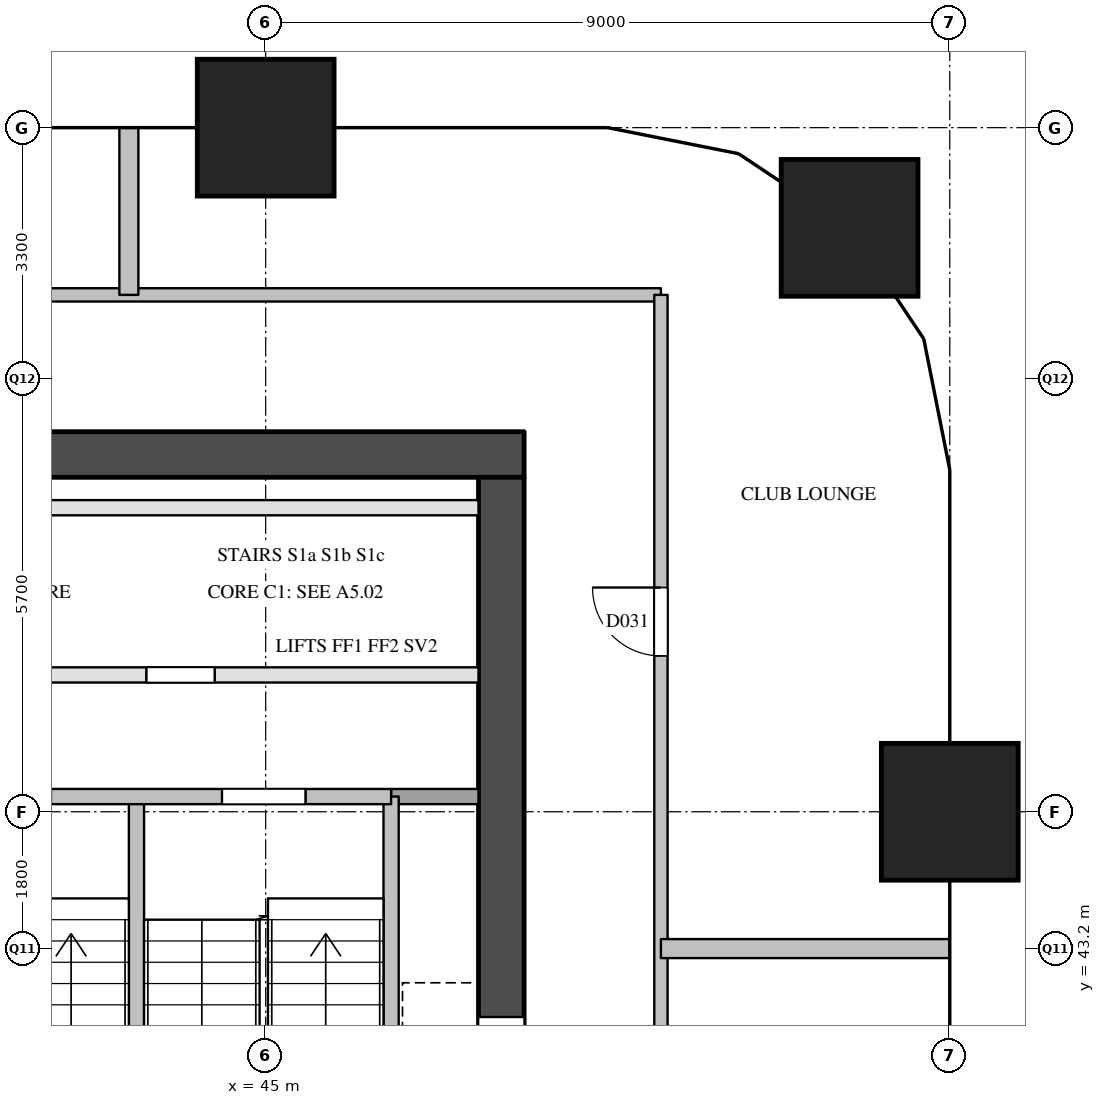
"""IFC4 building model, lengths in metres.
Left out: names, types, materials, properties, quantities, classifications, styles, units other than length and angle.
Written with IfcOpenShell. Run it as: python <this file> out.ifc"""

import sys

from ifc_helpers import new_model, si_unit, direction, frame, frame_2d, origin, origin_2d, place, context, subcontext, project, spatial, rectangle, extrude, element, fill, save


model = new_model("IFC4")
c1 = context("Model", 3, precision=1e-05, world=origin(), true_north=direction((0.0, 1.0)))
c2 = subcontext(c1, "Body", "Model", "MODEL_VIEW")
j1 = project(units=[si_unit("LENGTHUNIT", "METRE"), si_unit("PLANEANGLEUNIT", "RADIAN")], contexts=[c1])
p1 = place(None, origin())
s1 = spatial("IfcSite", under=j1, at=p1, CompositionType="ELEMENT")
p2 = place(p1, origin())
s2 = spatial("IfcBuilding", under=s1, at=p2, CompositionType="ELEMENT")
p3 = place(p2, frame((0.0, 0.0, 31.0)))
s3 = spatial("IfcBuildingStorey", under=s2, at=p3, CompositionType="ELEMENT", Elevation=31.0)
for number, where, z_axis, x_axis in (
    (1, (45.0, 54.0, 0.0), (0.0, 0.0, 1.0), (1.0, 0.0, 0.0)),
    (2, (54.0, 45.0, 0.0), (0.0, 0.0, 1.0), (1.0, 0.0, 0.0)),
    (3, (52.682, 52.682, 0.0), (0.0, 0.0, 1.0), (1.0, 0.0, 0.0)),
):
    element("IfcColumn", number, at=place(p3, frame(where, z_axis=z_axis, x_axis=x_axis)), inside=s3, PredefinedType="COLUMN", context=c2, shape_type="SweptSolid", body=[
        extrude(rectangle(XDim=1.8, YDim=1.8, at=origin_2d()), origin(), (0.0, 0.0, 1.0), 3.8),
    ])
p4 = place(p3, frame((36.0, 49.7, 0.0), z_axis=(0.0, 0.0, 1.0), x_axis=(1.0, 0.0, 0.0)))
e4 = element("IfcWall", 4, at=p4, inside=s3, PredefinedType="SHEAR", context=c2, shape_type="SweptSolid", body=[
    extrude(rectangle(XDim=12.4, YDim=0.6, at=frame_2d((6.2, 0.0))), origin(), (0.0, 0.0, 1.0), 3.5),
])
p5 = place(p3, frame((48.1, 29.1, 0.0), z_axis=(0.0, 0.0, 1.0), x_axis=(0.0, 1.0, 0.0)))
e5 = element("IfcWall", 5, at=p5, inside=s3, PredefinedType="SHEAR", context=c2, shape_type="SweptSolid", body=[
    extrude(rectangle(XDim=20.3, YDim=0.6, at=frame_2d((10.15, 0.0))), origin(), (0.0, 0.0, 1.0), 3.5),
])
p6 = place(p5, frame((12.5, 0.0, 0.0)))
e6 = element("IfcOpeningElement", 6, at=p6, cuts=e5, PredefinedType="OPENING", context=c2, shape_type="SweptSolid", body=[
    extrude(rectangle(XDim=0.7, YDim=2.1, at=frame_2d((0.35, 1.05))), frame((0.0, 0.31, 0.0), z_axis=(0.0, -1.0, 0.0), x_axis=(1.0, 0.0, 0.0)), (0.0, 0.0, 1.0), 0.62),
])
p7 = place(p5, frame((3.9, 0.0, 0.0)))
e7 = element("IfcOpeningElement", 7, at=p7, cuts=e5, PredefinedType="OPENING", context=c2, shape_type="SweptSolid", body=[
    extrude(rectangle(XDim=1.8, YDim=2.1, at=frame_2d((0.9, 1.05))), frame((0.0, 0.31, 0.0), z_axis=(0.0, -1.0, 0.0), x_axis=(1.0, 0.0, 0.0)), (0.0, 0.0, 1.0), 0.62),
])
for number, where, z_axis, x_axis in (
    (8, (43.3, 40.78, 0.0), (0.0, 0.0, 1.0), (0.0, 1.0, 0.0)),
    (9, (46.65, 40.78, 0.0), (0.0, 0.0, 1.0), (0.0, 1.0, 0.0)),
):
    element("IfcWall", number, at=place(p3, frame(where, z_axis=z_axis, x_axis=x_axis)), inside=s3, PredefinedType="SOLIDWALL", context=c2, shape_type="SweptSolid", body=[
        extrude(rectangle(XDim=4.42, YDim=0.2, at=frame_2d((2.21, 0.0))), origin(), (0.0, 0.0, 1.0), 3.5),
    ])
p8 = place(p3, frame((46.65, 45.2, 0.0), z_axis=(0.0, 0.0, 1.0), x_axis=(1.0, 0.0, 0.0)))
e10 = element("IfcWall", 10, at=p8, inside=s3, PredefinedType="SOLIDWALL", context=c2, shape_type="SweptSolid", body=[
    extrude(rectangle(XDim=1.15, YDim=0.2, at=frame_2d((0.575, 0.0))), origin(), (0.0, 0.0, 1.0), 3.5),
])
p9 = place(p3, frame((36.6, 45.2, 0.0), z_axis=(0.0, 0.0, 1.0), x_axis=(1.0, 0.0, 0.0)))
e11 = element("IfcWall", 11, at=p9, inside=s3, PredefinedType="SOLIDWALL", context=c2, shape_type="SweptSolid", body=[
    extrude(rectangle(XDim=10.05, YDim=0.2, at=frame_2d((5.025, 0.0))), origin(), (0.0, 0.0, 1.0), 3.5),
])
p10 = place(p9, frame((1.125, 0.0, 0.0)))
e12 = element("IfcOpeningElement", 12, at=p10, cuts=e11, PredefinedType="OPENING", context=c2, shape_type="SweptSolid", body=[
    extrude(rectangle(XDim=1.1, YDim=2.1, at=frame_2d((0.55, 1.05))), frame((0.0, 0.11, 0.0), z_axis=(0.0, -1.0, 0.0), x_axis=(1.0, 0.0, 0.0)), (0.0, 0.0, 1.0), 0.22),
])
p11 = place(p9, frame((4.475, 0.0, 0.0)))
e13 = element("IfcOpeningElement", 13, at=p11, cuts=e11, PredefinedType="OPENING", context=c2, shape_type="SweptSolid", body=[
    extrude(rectangle(XDim=1.1, YDim=2.1, at=frame_2d((0.55, 1.05))), frame((0.0, 0.11, 0.0), z_axis=(0.0, -1.0, 0.0), x_axis=(1.0, 0.0, 0.0)), (0.0, 0.0, 1.0), 0.22),
])
p12 = place(p9, frame((7.825, 0.0, 0.0)))
e14 = element("IfcOpeningElement", 14, at=p12, cuts=e11, PredefinedType="OPENING", context=c2, shape_type="SweptSolid", body=[
    extrude(rectangle(XDim=1.1, YDim=2.1, at=frame_2d((0.55, 1.05))), frame((0.0, 0.11, 0.0), z_axis=(0.0, -1.0, 0.0), x_axis=(1.0, 0.0, 0.0)), (0.0, 0.0, 1.0), 0.22),
])
p13 = place(p3, frame((36.6, 46.8, 0.0), z_axis=(0.0, 0.0, 1.0), x_axis=(1.0, 0.0, 0.0)))
e15 = element("IfcWall", 15, at=p13, inside=s3, PredefinedType="PARTITIONING", context=c2, shape_type="SweptSolid", body=[
    extrude(rectangle(XDim=11.2, YDim=0.2, at=frame_2d((5.6, 0.0))), origin(), (0.0, 0.0, 1.0), 3.5),
])
p14 = place(p13, frame((1.23, 0.0, 0.0)))
e16 = element("IfcOpeningElement", 16, at=p14, cuts=e15, PredefinedType="OPENING", context=c2, shape_type="SweptSolid", body=[
    extrude(rectangle(XDim=0.9, YDim=2.1, at=frame_2d((0.45, 1.05))), frame((0.0, 0.11, 0.0), z_axis=(0.0, -1.0, 0.0), x_axis=(1.0, 0.0, 0.0)), (0.0, 0.0, 1.0), 0.22),
])
p15 = place(p13, frame((6.83, 0.0, 0.0)))
e17 = element("IfcOpeningElement", 17, at=p15, cuts=e15, PredefinedType="OPENING", context=c2, shape_type="SweptSolid", body=[
    extrude(rectangle(XDim=0.9, YDim=2.1, at=frame_2d((0.45, 1.05))), frame((0.0, 0.11, 0.0), z_axis=(0.0, -1.0, 0.0), x_axis=(1.0, 0.0, 0.0)), (0.0, 0.0, 1.0), 0.22),
])
p16 = place(p3, frame((36.6, 49.0, 0.0), z_axis=(0.0, 0.0, 1.0), x_axis=(1.0, 0.0, 0.0)))
e18 = element("IfcWall", 18, at=p16, inside=s3, PredefinedType="PARTITIONING", context=c2, shape_type="SweptSolid", body=[
    extrude(rectangle(XDim=11.2, YDim=0.2, at=frame_2d((5.6, 0.0))), origin(), (0.0, 0.0, 1.0), 3.5),
])
p17 = place(p3, frame((34.2, 51.8, 0.0), z_axis=(0.0, 0.0, 1.0), x_axis=(1.0, 0.0, 0.0)))
e19 = element("IfcWall", 19, at=p17, inside=s3, PredefinedType="PARTITIONING", context=c2, shape_type="SweptSolid", body=[
    extrude(rectangle(XDim=16.0, YDim=0.175, at=frame_2d((8.0, 0.0))), origin(), (0.0, 0.0, 1.0), 3.5),
])
p18 = place(p17, frame((4.05, 0.0, 0.0)))
e20 = element("IfcOpeningElement", 20, at=p18, cuts=e19, PredefinedType="OPENING", context=c2, shape_type="SweptSolid", body=[
    extrude(rectangle(XDim=0.9, YDim=2.1, at=frame_2d((0.45, 1.05))), frame((0.0, 0.097, 0.0), z_axis=(0.0, -1.0, 0.0), x_axis=(1.0, 0.0, 0.0)), (0.0, 0.0, 1.0), 0.195),
])
p19 = place(p3, frame((50.2, 26.7, 0.0), z_axis=(0.0, 0.0, 1.0), x_axis=(0.0, 1.0, 0.0)))
e21 = element("IfcWall", 21, at=p19, inside=s3, PredefinedType="PARTITIONING", context=c2, shape_type="SweptSolid", body=[
    extrude(rectangle(XDim=25.1, YDim=0.175, at=frame_2d((12.55, 0.0))), origin(), (0.0, 0.0, 1.0), 2.5),
])
p20 = place(p19, frame((5.25, 0.0, 0.0)))
e22 = element("IfcOpeningElement", 22, at=p20, cuts=e21, PredefinedType="OPENING", context=c2, shape_type="SweptSolid", body=[
    extrude(rectangle(XDim=0.9, YDim=2.1, at=frame_2d((0.45, 1.05))), frame((0.0, 0.097, 0.0), z_axis=(0.0, -1.0, 0.0), x_axis=(1.0, 0.0, 0.0)), (0.0, 0.0, 1.0), 0.195),
])
p21 = place(p19, frame((13.35, 0.0, 0.0)))
e23 = element("IfcOpeningElement", 23, at=p21, cuts=e21, PredefinedType="OPENING", context=c2, shape_type="SweptSolid", body=[
    extrude(rectangle(XDim=0.9, YDim=2.1, at=frame_2d((0.45, 1.05))), frame((0.0, 0.097, 0.0), z_axis=(0.0, -1.0, 0.0), x_axis=(1.0, 0.0, 0.0)), (0.0, 0.0, 1.0), 0.195),
])
p22 = place(p19, frame((20.35, 0.0, 0.0)))
e24 = element("IfcOpeningElement", 24, at=p22, cuts=e21, PredefinedType="OPENING", context=c2, shape_type="SweptSolid", body=[
    extrude(rectangle(XDim=0.9, YDim=2.1, at=frame_2d((0.45, 1.05))), frame((0.0, 0.097, 0.0), z_axis=(0.0, -1.0, 0.0), x_axis=(1.0, 0.0, 0.0)), (0.0, 0.0, 1.0), 0.195),
])
p23 = place(p3, frame((50.2, 43.2, 0.0), z_axis=(0.0, 0.0, 1.0), x_axis=(1.0, 0.0, 0.0)))
e25 = element("IfcWall", 25, at=p23, inside=s3, PredefinedType="PARTITIONING", context=c2, shape_type="SweptSolid", body=[
    extrude(rectangle(XDim=3.8, YDim=0.25, at=frame_2d((1.9, 0.0))), origin(), (0.0, 0.0, 1.0), 2.5),
])
p24 = place(p3, frame((43.2, 51.8, 0.0), z_axis=(0.0, 0.0, 1.0), x_axis=(0.0, 1.0, 0.0)))
e26 = element("IfcWall", 26, at=p24, inside=s3, PredefinedType="PARTITIONING", context=c2, shape_type="SweptSolid", body=[
    extrude(rectangle(XDim=2.2, YDim=0.25, at=frame_2d((1.1, 0.0))), origin(), (0.0, 0.0, 1.0), 2.5),
])
p25 = place(p12, origin())
e27 = element("IfcDoor", 27, at=p25, inside=s3, OperationType="SINGLE_SWING_RIGHT", PredefinedType="DOOR", context=c2, shape_type="SweptSolid", body=[
    extrude(rectangle(XDim=1.1, YDim=2.1, at=frame_2d((0.55, 1.05))), frame((0.0, 0.025, 0.0), z_axis=(0.0, -1.0, 0.0), x_axis=(1.0, 0.0, 0.0)), (0.0, 0.0, 1.0), 0.05),
])
fill(e14, e27)
p26 = place(p6, origin())
e28 = element("IfcDoor", 28, at=p26, inside=s3, OperationType="SINGLE_SWING_RIGHT", PredefinedType="DOOR", context=c2, shape_type="SweptSolid", body=[
    extrude(rectangle(XDim=0.7, YDim=2.1, at=frame_2d((0.35, 1.05))), frame((0.0, 0.025, 0.0), z_axis=(0.0, -1.0, 0.0), x_axis=(1.0, 0.0, 0.0)), (0.0, 0.0, 1.0), 0.05),
])
fill(e6, e28)
p27 = place(p15, origin())
e29 = element("IfcDoor", 29, at=p27, inside=s3, OperationType="SINGLE_SWING_RIGHT", PredefinedType="DOOR", context=c2, shape_type="SweptSolid", body=[
    extrude(rectangle(XDim=0.9, YDim=2.1, at=frame_2d((0.45, 1.05))), frame((0.0, 0.025, 0.0), z_axis=(0.0, -1.0, 0.0), x_axis=(1.0, 0.0, 0.0)), (0.0, 0.0, 1.0), 0.05),
])
fill(e17, e29)
p28 = place(p22, origin())
e30 = element("IfcDoor", 30, at=p28, inside=s3, OperationType="SINGLE_SWING_RIGHT", PredefinedType="DOOR", context=c2, shape_type="SweptSolid", body=[
    extrude(rectangle(XDim=0.9, YDim=2.1, at=frame_2d((0.45, 1.05))), frame((0.0, 0.025, 0.0), z_axis=(0.0, -1.0, 0.0), x_axis=(1.0, 0.0, 0.0)), (0.0, 0.0, 1.0), 0.05),
])
fill(e24, e30)
save(model, sys.argv[1])
